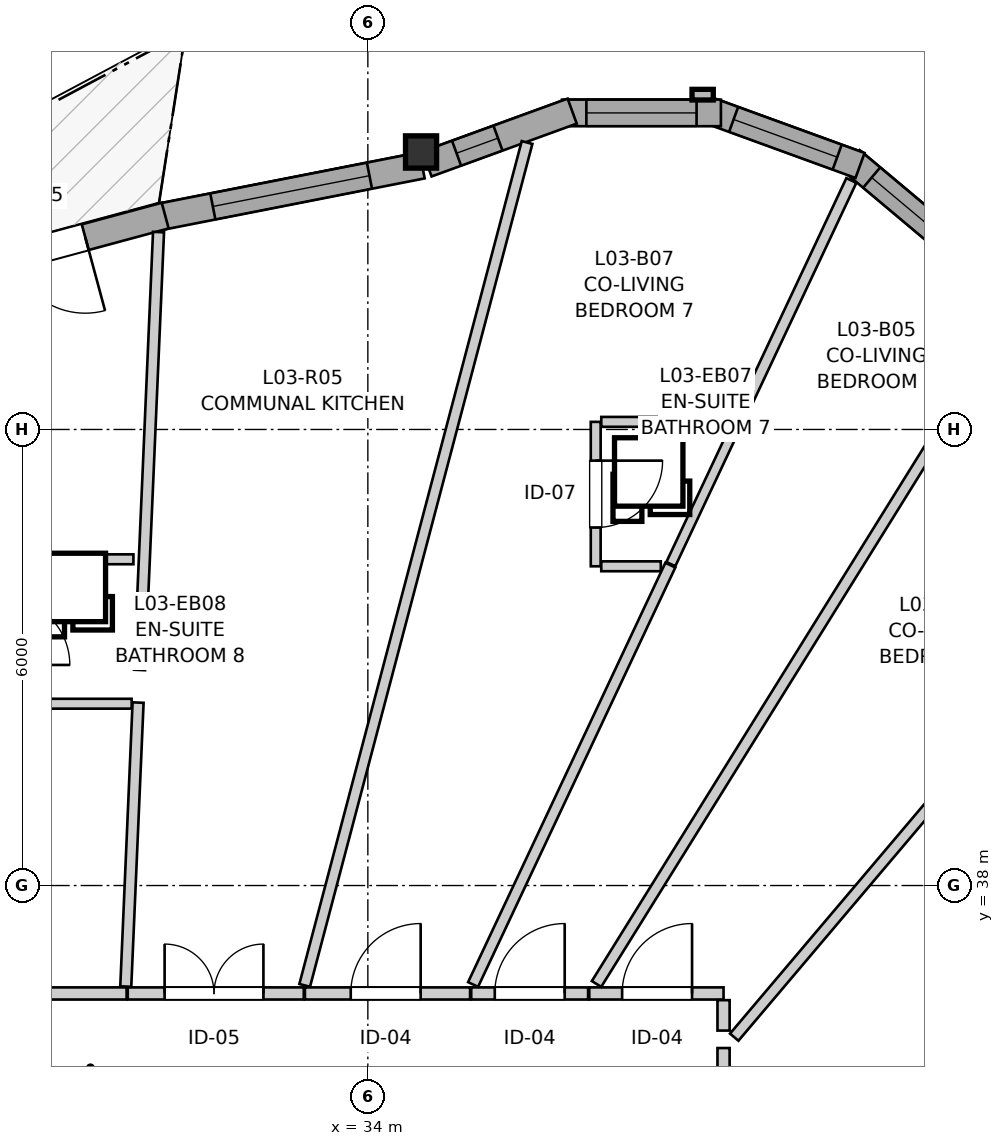
"""IFC4 building model, lengths in metres.
Left out: names, types, materials, properties, quantities, classifications, styles, units other than length and angle.
Written with IfcOpenShell. Run it as: python <this file> out.ifc"""

import sys

from ifc_helpers import new_model, si_unit, direction, frame, frame_2d, origin, origin_2d, place, context, subcontext, project, spatial, rectangle, i_section, extrude, source, transform, mapped, element, fill, save


model = new_model("IFC4")
c1 = context("Model", 3, precision=1e-05, world=origin(), true_north=direction((0.0, 1.0)))
c2 = subcontext(c1, "Body", "Model", "MODEL_VIEW")
j1 = project(units=[si_unit("LENGTHUNIT", "METRE"), si_unit("PLANEANGLEUNIT", "RADIAN")], contexts=[c1])
p1 = place(None, origin())
s1 = spatial("IfcSite", under=j1, at=p1, CompositionType="ELEMENT")
p2 = place(p1, origin())
s2 = spatial("IfcBuilding", under=s1, at=p2, CompositionType="ELEMENT")
p3 = place(p2, frame((0.0, 0.0, 14.2)))
s3 = spatial("IfcBuildingStorey", under=s2, at=p3, CompositionType="ELEMENT", Elevation=14.2)
m1 = source(origin(), c2, "Body", "SweptSolid", [
    extrude(i_section(OverallWidth=0.409, OverallDepth=0.425, WebThickness=0.03, FlangeThickness=0.048, FilletRadius=0.015, at=origin_2d()), origin(), (0.0, 0.0, 1.0), 2.94),
])
p4 = place(p3, frame((34.7, 47.651, 0.0), z_axis=(0.0, 0.0, 1.0), x_axis=(1.0, 0.0, 0.0)))
e1 = element("IfcColumn", 1, at=p4, inside=s3, PredefinedType="PILASTER", context=c2, shape_type="MappedRepresentation", body=[
    mapped(m1, transform((0.0, 0.0, 0.0), x_axis=(1.0, 0.0, 0.0), y_axis=(0.0, 1.0, 0.0), z_axis=(0.0, 0.0, 1.0), scale=1.0)),
])
p5 = place(p3, frame((41.96, 46.198, 0.0), z_axis=(0.0, 0.0, 1.0), x_axis=(-0.766082082368, 0.642742750308, 0.0)))
e2 = element("IfcWall", 2, at=p5, inside=s3, PredefinedType="SOLIDWALL", context=c2, shape_type="SweptSolid", body=[
    extrude(rectangle(XDim=2.09, YDim=0.35, at=frame_2d((1.045, 0.0))), origin(), (0.0, 0.0, 1.0), 2.42),
])
p6 = place(p5, frame((0.287, 0.0, 0.82)))
e3 = element("IfcOpeningElement", 3, at=p6, cuts=e2, PredefinedType="OPENING", context=c2, shape_type="SweptSolid", body=[
    extrude(rectangle(XDim=1.45, YDim=1.25, at=frame_2d((0.725, 0.625))), frame((0.0, 0.185, 0.0), z_axis=(0.0, -1.0, 0.0), x_axis=(1.0, 0.0, 0.0)), (0.0, 0.0, 1.0), 0.37),
])
p7 = place(p3, frame((40.476, 47.473, 0.0), z_axis=(0.0, 0.0, 1.0), x_axis=(-0.939660353162, 0.342108784886, 0.0)))
e4 = element("IfcWall", 4, at=p7, inside=s3, PredefinedType="SOLIDWALL", context=c2, shape_type="SweptSolid", body=[
    extrude(rectangle(XDim=2.09, YDim=0.35, at=frame_2d((1.045, 0.0))), origin(), (0.0, 0.0, 1.0), 2.42),
])
p8 = place(p7, frame((0.32, 0.0, 0.82)))
e5 = element("IfcOpeningElement", 5, at=p8, cuts=e4, PredefinedType="OPENING", context=c2, shape_type="SweptSolid", body=[
    extrude(rectangle(XDim=1.45, YDim=1.25, at=frame_2d((0.725, 0.625))), frame((0.0, 0.185, 0.0), z_axis=(0.0, -1.0, 0.0), x_axis=(1.0, 0.0, 0.0)), (0.0, 0.0, 1.0), 0.37),
])
p9 = place(p3, frame((38.645, 48.165, 0.0), z_axis=(0.0, 0.0, 1.0), x_axis=(-1.0, 0.0, 0.0)))
e6 = element("IfcWall", 6, at=p9, inside=s3, PredefinedType="SOLIDWALL", context=c2, shape_type="SweptSolid", body=[
    extrude(rectangle(XDim=2.091, YDim=0.35, at=frame_2d((1.045, 0.0))), origin(), (0.0, 0.0, 1.0), 2.42),
])
p10 = place(p9, frame((0.32, 0.0, 0.82)))
e7 = element("IfcOpeningElement", 7, at=p10, cuts=e6, PredefinedType="OPENING", context=c2, shape_type="SweptSolid", body=[
    extrude(rectangle(XDim=1.45, YDim=1.25, at=frame_2d((0.725, 0.625))), frame((0.0, 0.185, 0.0), z_axis=(0.0, -1.0, 0.0), x_axis=(1.0, 0.0, 0.0)), (0.0, 0.0, 1.0), 0.37),
])
p11 = place(p3, frame((36.688, 48.188, 0.0), z_axis=(0.0, 0.0, 1.0), x_axis=(-0.939653047052, -0.342128851701, 0.0)))
e8 = element("IfcWall", 8, at=p11, inside=s3, PredefinedType="SOLIDWALL", context=c2, shape_type="SweptSolid", body=[
    extrude(rectangle(XDim=2.032, YDim=0.35, at=frame_2d((1.016, 0.0))), origin(), (0.0, 0.0, 1.0), 2.42),
])
p12 = place(p11, frame((1.039, 0.0, 0.82)))
e9 = element("IfcOpeningElement", 9, at=p12, cuts=e8, PredefinedType="OPENING", context=c2, shape_type="SweptSolid", body=[
    extrude(rectangle(XDim=0.58, YDim=1.35, at=frame_2d((0.29, 0.675))), frame((0.0, 0.185, 0.0), z_axis=(0.0, -1.0, 0.0), x_axis=(1.0, 0.0, 0.0)), (0.0, 0.0, 1.0), 0.37),
])
p13 = place(p3, frame((34.714, 47.475, 0.0), z_axis=(0.0, 0.0, 1.0), x_axis=(-0.981221268425, -0.192885516282, 0.0)))
e10 = element("IfcWall", 10, at=p13, inside=s3, PredefinedType="SOLIDWALL", context=c2, shape_type="SweptSolid", body=[
    extrude(rectangle(XDim=3.533, YDim=0.35, at=frame_2d((1.766, 0.0))), origin(), (0.0, 0.0, 1.0), 2.42),
])
p14 = place(p13, frame((0.706, 0.0, 0.82)))
e11 = element("IfcOpeningElement", 11, at=p14, cuts=e10, PredefinedType="OPENING", context=c2, shape_type="SweptSolid", body=[
    extrude(rectangle(XDim=2.1, YDim=1.4, at=frame_2d((1.05, 0.7))), frame((0.0, 0.185, 0.0), z_axis=(0.0, -1.0, 0.0), x_axis=(1.0, 0.0, 0.0)), (0.0, 0.0, 1.0), 0.37),
])
p15 = place(p3, frame((31.333, 46.814, 0.0), z_axis=(0.0, 0.0, 1.0), x_axis=(-0.965456905924, -0.260562780926, 0.0)))
e12 = element("IfcWall", 12, at=p15, inside=s3, PredefinedType="SOLIDWALL", context=c2, shape_type="SweptSolid", body=[
    extrude(rectangle(XDim=3.179, YDim=0.35, at=frame_2d((1.59, 0.0))), origin(), (0.0, 0.0, 1.0), 2.42),
])
p16 = place(p15, frame((1.09, 0.0, 0.0)))
e13 = element("IfcOpeningElement", 13, at=p16, cuts=e12, PredefinedType="OPENING", context=c2, shape_type="SweptSolid", body=[
    extrude(rectangle(XDim=1.0, YDim=2.1, at=frame_2d((0.5, 1.05))), frame((0.0, 0.185, 0.0), z_axis=(0.0, -1.0, 0.0), x_axis=(1.0, 0.0, 0.0)), (0.0, 0.0, 1.0), 0.37),
])
p17 = place(p3, frame((27.756, 36.58, 0.0), z_axis=(0.0, 0.0, 1.0), x_axis=(1.0, 0.0, 0.0)))
e14 = element("IfcWall", 14, at=p17, inside=s3, PredefinedType="PARTITIONING", context=c2, shape_type="SweptSolid", body=[
    extrude(rectangle(XDim=3.07, YDim=0.16, at=frame_2d((1.535, 0.0))), origin(), (0.0, 0.0, 1.0), 2.94),
])
p18 = place(p17, frame((1.052, 0.0, 0.0)))
e15 = element("IfcOpeningElement", 15, at=p18, cuts=e14, PredefinedType="OPENING", context=c2, shape_type="SweptSolid", body=[
    extrude(rectangle(XDim=0.92, YDim=2.1, at=frame_2d((0.46, 1.05))), frame((0.0, 0.09, 0.0), z_axis=(0.0, -1.0, 0.0), x_axis=(1.0, 0.0, 0.0)), (0.0, 0.0, 1.0), 0.18),
])
p19 = place(p3, frame((38.68, 35.862, 0.0), z_axis=(0.0, 0.0, 1.0), x_axis=(0.0, -1.0, 0.0)))
e16 = element("IfcWall", 16, at=p19, inside=s3, PredefinedType="PARTITIONING", context=c2, shape_type="SweptSolid", body=[
    extrude(rectangle(XDim=3.024, YDim=0.16, at=frame_2d((1.512, 0.0))), origin(), (0.0, 0.0, 1.0), 2.94),
])
p20 = place(p19, frame((1.053, 0.0, 0.0)))
e17 = element("IfcOpeningElement", 17, at=p20, cuts=e16, PredefinedType="OPENING", context=c2, shape_type="SweptSolid", body=[
    extrude(rectangle(XDim=0.92, YDim=2.1, at=frame_2d((0.46, 1.05))), frame((0.0, 0.09, 0.0), z_axis=(0.0, -1.0, 0.0), x_axis=(1.0, 0.0, 0.0)), (0.0, 0.0, 1.0), 0.18),
])
p21 = place(p3, frame((30.841, 36.58, 0.0), z_axis=(0.0, 0.0, 1.0), x_axis=(1.0, 0.0, 0.0)))
e18 = element("IfcWall", 18, at=p21, inside=s3, PredefinedType="PARTITIONING", context=c2, shape_type="SweptSolid", body=[
    extrude(rectangle(XDim=2.316, YDim=0.16, at=frame_2d((1.158, 0.0))), origin(), (0.0, 0.0, 1.0), 2.94),
])
p22 = place(p21, frame((0.485, 0.0, 0.0)))
e19 = element("IfcOpeningElement", 19, at=p22, cuts=e18, PredefinedType="OPENING", context=c2, shape_type="SweptSolid", body=[
    extrude(rectangle(XDim=1.3, YDim=2.1, at=frame_2d((0.65, 1.05))), frame((0.0, 0.09, 0.0), z_axis=(0.0, -1.0, 0.0), x_axis=(1.0, 0.0, 0.0)), (0.0, 0.0, 1.0), 0.18),
])
p23 = place(p3, frame((33.172, 36.58, 0.0), z_axis=(0.0, 0.0, 1.0), x_axis=(1.0, 0.0, 0.0)))
e20 = element("IfcWall", 20, at=p23, inside=s3, PredefinedType="PARTITIONING", context=c2, shape_type="SweptSolid", body=[
    extrude(rectangle(XDim=2.173, YDim=0.16, at=frame_2d((1.086, 0.0))), origin(), (0.0, 0.0, 1.0), 2.94),
])
p24 = place(p23, frame((0.603, 0.0, 0.0)))
e21 = element("IfcOpeningElement", 21, at=p24, cuts=e20, PredefinedType="OPENING", context=c2, shape_type="SweptSolid", body=[
    extrude(rectangle(XDim=0.92, YDim=2.1, at=frame_2d((0.46, 1.05))), frame((0.0, 0.09, 0.0), z_axis=(0.0, -1.0, 0.0), x_axis=(1.0, 0.0, 0.0)), (0.0, 0.0, 1.0), 0.18),
])
p25 = place(p3, frame((36.998, 44.1, 0.0), z_axis=(0.0, 0.0, 1.0), x_axis=(0.0, -1.0, 0.0)))
e22 = element("IfcWall", 22, at=p25, inside=s3, PredefinedType="PARTITIONING", context=c2, shape_type="SweptSolid", body=[
    extrude(rectangle(XDim=1.9, YDim=0.13, at=frame_2d((0.95, 0.0))), origin(), (0.0, 0.0, 1.0), 2.94),
])
p26 = place(p25, frame((0.51, 0.0, 0.0)))
e23 = element("IfcOpeningElement", 23, at=p26, cuts=e22, PredefinedType="OPENING", context=c2, shape_type="SweptSolid", body=[
    extrude(rectangle(XDim=0.88, YDim=2.05, at=frame_2d((0.44, 1.025))), frame((0.0, 0.075, 0.0), z_axis=(0.0, -1.0, 0.0), x_axis=(1.0, 0.0, 0.0)), (0.0, 0.0, 1.0), 0.15),
])
p27 = place(p3, frame((36.913, 36.58, 0.0), z_axis=(0.0, 0.0, 1.0), x_axis=(1.0, 0.0, 0.0)))
e24 = element("IfcWall", 24, at=p27, inside=s3, PredefinedType="PARTITIONING", context=c2, shape_type="SweptSolid", body=[
    extrude(rectangle(XDim=1.767, YDim=0.16, at=frame_2d((0.883, 0.0))), origin(), (0.0, 0.0, 1.0), 2.94),
])
p28 = place(p27, frame((0.433, 0.0, 0.0)))
e25 = element("IfcOpeningElement", 25, at=p28, cuts=e24, PredefinedType="OPENING", context=c2, shape_type="SweptSolid", body=[
    extrude(rectangle(XDim=0.92, YDim=2.1, at=frame_2d((0.46, 1.05))), frame((0.0, 0.09, 0.0), z_axis=(0.0, -1.0, 0.0), x_axis=(1.0, 0.0, 0.0)), (0.0, 0.0, 1.0), 0.18),
])
p29 = place(p3, frame((35.36, 36.58, 0.0), z_axis=(0.0, 0.0, 1.0), x_axis=(1.0, 0.0, 0.0)))
e26 = element("IfcWall", 26, at=p29, inside=s3, PredefinedType="PARTITIONING", context=c2, shape_type="SweptSolid", body=[
    extrude(rectangle(XDim=1.538, YDim=0.16, at=frame_2d((0.769, 0.0))), origin(), (0.0, 0.0, 1.0), 2.94),
])
p30 = place(p29, frame((0.31, 0.0, 0.0)))
e27 = element("IfcOpeningElement", 27, at=p30, cuts=e26, PredefinedType="OPENING", context=c2, shape_type="SweptSolid", body=[
    extrude(rectangle(XDim=0.92, YDim=2.1, at=frame_2d((0.46, 1.05))), frame((0.0, 0.09, 0.0), z_axis=(0.0, -1.0, 0.0), x_axis=(1.0, 0.0, 0.0)), (0.0, 0.0, 1.0), 0.18),
])
p31 = place(p3, frame((33.169, 36.686, 0.0), z_axis=(0.0, 0.0, 1.0), x_axis=(0.255112522394, 0.966911371801, 0.0)))
e28 = element("IfcWall", 28, at=p31, inside=s3, PredefinedType="PARTITIONING", context=c2, shape_type="SweptSolid", body=[
    extrude(rectangle(XDim=11.469, YDim=0.145, at=frame_2d((5.734, 0.0))), origin(), (0.0, 0.0, 1.0), 2.94),
])
p32 = place(p3, frame((37.009, 36.705, 0.0), z_axis=(0.0, 0.0, 1.0), x_axis=(0.528183829193, 0.849130050451, 0.0)))
e29 = element("IfcWall", 29, at=p32, inside=s3, PredefinedType="PARTITIONING", context=c2, shape_type="SweptSolid", body=[
    extrude(rectangle(XDim=10.005, YDim=0.145, at=frame_2d((5.003, 0.0))), origin(), (0.0, 0.0, 1.0), 2.94),
])
p33 = place(p3, frame((38.812, 32.967, 0.0), z_axis=(0.0, 0.0, 1.0), x_axis=(0.772048037558, 0.635564180633, 0.0)))
e30 = element("IfcWall", 30, at=p33, inside=s3, PredefinedType="PARTITIONING", context=c2, shape_type="SweptSolid", body=[
    extrude(rectangle(XDim=7.477, YDim=0.145, at=frame_2d((3.739, 0.0))), origin(), (0.0, 0.0, 1.0), 2.94),
])
p34 = place(p3, frame((38.821, 36.005, 0.0), z_axis=(0.0, 0.0, 1.0), x_axis=(0.646174151972, 0.76318999294, 0.0)))
e31 = element("IfcWall", 31, at=p34, inside=s3, PredefinedType="PARTITIONING", context=c2, shape_type="SweptSolid", body=[
    extrude(rectangle(XDim=7.125, YDim=0.145, at=frame_2d((3.562, 0.0))), origin(), (0.0, 0.0, 1.0), 2.94),
])
p35 = place(p3, frame((35.385, 36.698, 0.0), z_axis=(0.0, 0.0, 1.0), x_axis=(0.425687116038, 0.904870421242, 0.0)))
e32 = element("IfcWall", 32, at=p35, inside=s3, PredefinedType="PARTITIONING", context=c2, shape_type="SweptSolid", body=[
    extrude(rectangle(XDim=6.097, YDim=0.145, at=frame_2d((3.049, 0.0))), origin(), (0.0, 0.0, 1.0), 2.94),
])
p36 = place(p3, frame((30.996, 40.836, 0.0), z_axis=(0.0, 0.0, 1.0), x_axis=(0.043354544378, 0.999059749706, 0.0)))
e33 = element("IfcWall", 33, at=p36, inside=s3, PredefinedType="PARTITIONING", context=c2, shape_type="SweptSolid", body=[
    extrude(rectangle(XDim=5.766, YDim=0.145, at=frame_2d((2.883, 0.0))), origin(), (0.0, 0.0, 1.0), 2.94),
])
p37 = place(p3, frame((30.815, 36.671, 0.0), z_axis=(0.0, 0.0, 1.0), x_axis=(0.043352224588, 0.999059850371, 0.0)))
e34 = element("IfcWall", 34, at=p37, inside=s3, PredefinedType="PARTITIONING", context=c2, shape_type="SweptSolid", body=[
    extrude(rectangle(XDim=3.739, YDim=0.145, at=frame_2d((1.87, 0.0))), origin(), (0.0, 0.0, 1.0), 2.94),
])
p38 = place(p3, frame((38.783, 43.921, 0.0), z_axis=(0.0, 0.0, 1.0), x_axis=(0.425698730146, 0.904864957412, 0.0)))
e35 = element("IfcWall", 35, at=p38, inside=s3, PredefinedType="PARTITIONING", context=c2, shape_type="SweptSolid", body=[
    extrude(rectangle(XDim=3.708, YDim=0.145, at=frame_2d((1.854, 0.0))), origin(), (0.0, 0.0, 1.0), 2.94),
])
p39 = place(p3, frame((37.987, 42.229, 0.0), z_axis=(0.0, 0.0, 1.0), x_axis=(0.425771690569, 0.904830629184, 0.0)))
e36 = element("IfcWall", 36, at=p39, inside=s3, PredefinedType="PARTITIONING", context=c2, shape_type="SweptSolid", body=[
    extrude(rectangle(XDim=1.855, YDim=0.13, at=frame_2d((0.928, 0.0))), origin(), (0.0, 0.0, 1.0), 2.94),
])
p40 = place(p3, frame((37.071, 44.1, 0.0), z_axis=(0.0, 0.0, 1.0), x_axis=(1.0, 0.0, 0.0)))
e37 = element("IfcWall", 37, at=p40, inside=s3, PredefinedType="PARTITIONING", context=c2, shape_type="SweptSolid", body=[
    extrude(rectangle(XDim=1.608, YDim=0.13, at=frame_2d((0.804, 0.0))), origin(), (0.0, 0.0, 1.0), 2.94),
])
p41 = place(p3, frame((29.272, 42.292, 0.0), z_axis=(0.0, 0.0, 1.0), x_axis=(1.0, 0.0, 0.0)))
e38 = element("IfcWall", 38, at=p41, inside=s3, PredefinedType="PARTITIONING", context=c2, shape_type="SweptSolid", body=[
    extrude(rectangle(XDim=1.644, YDim=0.13, at=frame_2d((0.822, 0.0))), origin(), (0.0, 0.0, 1.0), 2.508),
])
p42 = place(p3, frame((29.272, 40.392, 0.0), z_axis=(0.0, 0.0, 1.0), x_axis=(1.0, 0.0, 0.0)))
e39 = element("IfcWall", 39, at=p42, inside=s3, PredefinedType="PARTITIONING", context=c2, shape_type="SweptSolid", body=[
    extrude(rectangle(XDim=1.621, YDim=0.13, at=frame_2d((0.81, 0.0))), origin(), (0.0, 0.0, 1.0), 2.94),
])
p43 = place(p3, frame((37.071, 42.2, 0.0), z_axis=(0.0, 0.0, 1.0), x_axis=(1.0, 0.0, 0.0)))
e40 = element("IfcWall", 40, at=p43, inside=s3, PredefinedType="PARTITIONING", context=c2, shape_type="SweptSolid", body=[
    extrude(rectangle(XDim=0.783, YDim=0.13, at=frame_2d((0.392, 0.0))), origin(), (0.0, 0.0, 1.0), 2.94),
])
p44 = place(p3, frame((38.68, 36.092, 0.0), z_axis=(0.0, 0.0, 1.0), x_axis=(0.0, 1.0, 0.0)))
e41 = element("IfcWall", 41, at=p44, inside=s3, PredefinedType="PARTITIONING", context=c2, shape_type="SweptSolid", body=[
    extrude(rectangle(XDim=0.4, YDim=0.16, at=frame_2d((0.2, 0.0))), origin(), (0.0, 0.0, 1.0), 2.94),
])
m2 = source(origin(), c2, "Body", "SweptSolid", [
    extrude(rectangle(XDim=1.45, YDim=1.25, at=frame_2d((0.725, 0.625))), frame((0.0, 0.03, 0.0), z_axis=(0.0, -1.0, 0.0), x_axis=(1.0, 0.0, 0.0)), (0.0, 0.0, 1.0), 0.06),
])
p45 = place(p6, origin())
e42 = element("IfcWindow", 42, at=p45, inside=s3, PartitioningType="SINGLE_PANEL", PredefinedType="WINDOW", context=c2, shape_type="MappedRepresentation", body=[
    mapped(m2, transform((0.0, 0.0, 0.0), x_axis=(1.0, 0.0, 0.0), y_axis=(0.0, 1.0, 0.0), z_axis=(0.0, 0.0, 1.0), scale=1.0)),
])
fill(e3, e42)
p46 = place(p8, origin())
e43 = element("IfcWindow", 43, at=p46, inside=s3, PartitioningType="SINGLE_PANEL", PredefinedType="WINDOW", context=c2, shape_type="MappedRepresentation", body=[
    mapped(m2, transform((0.0, 0.0, 0.0), x_axis=(1.0, 0.0, 0.0), y_axis=(0.0, 1.0, 0.0), z_axis=(0.0, 0.0, 1.0), scale=1.0)),
])
fill(e5, e43)
p47 = place(p10, origin())
e44 = element("IfcWindow", 44, at=p47, inside=s3, PartitioningType="SINGLE_PANEL", PredefinedType="WINDOW", context=c2, shape_type="MappedRepresentation", body=[
    mapped(m2, transform((0.0, 0.0, 0.0), x_axis=(1.0, 0.0, 0.0), y_axis=(0.0, 1.0, 0.0), z_axis=(0.0, 0.0, 1.0), scale=1.0)),
])
fill(e7, e44)
m3 = source(origin(), c2, "Body", "SweptSolid", [
    extrude(rectangle(XDim=0.58, YDim=1.35, at=frame_2d((0.29, 0.675))), frame((0.0, 0.03, 0.0), z_axis=(0.0, -1.0, 0.0), x_axis=(1.0, 0.0, 0.0)), (0.0, 0.0, 1.0), 0.06),
])
p48 = place(p12, origin())
e45 = element("IfcWindow", 45, at=p48, inside=s3, PartitioningType="SINGLE_PANEL", PredefinedType="WINDOW", context=c2, shape_type="MappedRepresentation", body=[
    mapped(m3, transform((0.0, 0.0, 0.0), x_axis=(1.0, 0.0, 0.0), y_axis=(0.0, 1.0, 0.0), z_axis=(0.0, 0.0, 1.0), scale=1.0)),
])
fill(e9, e45)
m4 = source(origin(), c2, "Body", "SweptSolid", [
    extrude(rectangle(XDim=2.1, YDim=1.4, at=frame_2d((1.05, 0.7))), frame((0.0, 0.03, 0.0), z_axis=(0.0, -1.0, 0.0), x_axis=(1.0, 0.0, 0.0)), (0.0, 0.0, 1.0), 0.06),
])
p49 = place(p14, origin())
e46 = element("IfcWindow", 46, at=p49, inside=s3, PartitioningType="SINGLE_PANEL", PredefinedType="WINDOW", context=c2, shape_type="MappedRepresentation", body=[
    mapped(m4, transform((0.0, 0.0, 0.0), x_axis=(1.0, 0.0, 0.0), y_axis=(0.0, 1.0, 0.0), z_axis=(0.0, 0.0, 1.0), scale=1.0)),
])
fill(e11, e46)
m5 = source(origin(), c2, "Body", "SweptSolid", [
    extrude(rectangle(XDim=1.0, YDim=2.1, at=frame_2d((0.5, 1.05))), frame((0.0, 0.025, 0.0), z_axis=(0.0, -1.0, 0.0), x_axis=(1.0, 0.0, 0.0)), (0.0, 0.0, 1.0), 0.05),
])
p50 = place(p16, origin())
e47 = element("IfcDoor", 47, at=p50, inside=s3, OperationType="SINGLE_SWING_LEFT", PredefinedType="DOOR", context=c2, shape_type="MappedRepresentation", body=[
    mapped(m5, transform((0.0, 0.0, 0.0), x_axis=(1.0, 0.0, 0.0), y_axis=(0.0, 1.0, 0.0), z_axis=(0.0, 0.0, 1.0), scale=1.0)),
])
fill(e13, e47)
m6 = source(origin(), c2, "Body", "SweptSolid", [
    extrude(rectangle(XDim=1.3, YDim=2.1, at=frame_2d((0.65, 1.05))), frame((0.0, 0.025, 0.0), z_axis=(0.0, -1.0, 0.0), x_axis=(1.0, 0.0, 0.0)), (0.0, 0.0, 1.0), 0.05),
])
p51 = place(p22, origin())
e48 = element("IfcDoor", 48, at=p51, inside=s3, OperationType="DOUBLE_DOOR_SINGLE_SWING", PredefinedType="DOOR", context=c2, shape_type="MappedRepresentation", body=[
    mapped(m6, transform((0.0, 0.0, 0.0), x_axis=(1.0, 0.0, 0.0), y_axis=(0.0, 1.0, 0.0), z_axis=(0.0, 0.0, 1.0), scale=1.0)),
])
fill(e19, e48)
m7 = source(origin(), c2, "Body", "SweptSolid", [
    extrude(rectangle(XDim=0.92, YDim=2.1, at=frame_2d((0.46, 1.05))), frame((0.0, 0.025, 0.0), z_axis=(0.0, -1.0, 0.0), x_axis=(1.0, 0.0, 0.0)), (0.0, 0.0, 1.0), 0.05),
])
p52 = place(p24, origin())
e49 = element("IfcDoor", 49, at=p52, inside=s3, OperationType="SINGLE_SWING_RIGHT", PredefinedType="DOOR", context=c2, shape_type="MappedRepresentation", body=[
    mapped(m7, transform((0.0, 0.0, 0.0), x_axis=(1.0, 0.0, 0.0), y_axis=(0.0, 1.0, 0.0), z_axis=(0.0, 0.0, 1.0), scale=1.0)),
])
fill(e21, e49)
m8 = source(origin(), c2, "Body", "SweptSolid", [
    extrude(rectangle(XDim=0.88, YDim=2.05, at=frame_2d((0.44, 1.025))), frame((0.0, 0.025, 0.0), z_axis=(0.0, -1.0, 0.0), x_axis=(1.0, 0.0, 0.0)), (0.0, 0.0, 1.0), 0.05),
])
p53 = place(p26, origin())
e50 = element("IfcDoor", 50, at=p53, inside=s3, OperationType="SINGLE_SWING_LEFT", PredefinedType="DOOR", context=c2, shape_type="MappedRepresentation", body=[
    mapped(m8, transform((0.0, 0.0, 0.0), x_axis=(1.0, 0.0, 0.0), y_axis=(0.0, 1.0, 0.0), z_axis=(0.0, 0.0, 1.0), scale=1.0)),
])
fill(e23, e50)
p54 = place(p28, origin())
e51 = element("IfcDoor", 51, at=p54, inside=s3, OperationType="SINGLE_SWING_RIGHT", PredefinedType="DOOR", context=c2, shape_type="MappedRepresentation", body=[
    mapped(m7, transform((0.0, 0.0, 0.0), x_axis=(1.0, 0.0, 0.0), y_axis=(0.0, 1.0, 0.0), z_axis=(0.0, 0.0, 1.0), scale=1.0)),
])
fill(e25, e51)
p55 = place(p30, origin())
e52 = element("IfcDoor", 52, at=p55, inside=s3, OperationType="SINGLE_SWING_RIGHT", PredefinedType="DOOR", context=c2, shape_type="MappedRepresentation", body=[
    mapped(m7, transform((0.0, 0.0, 0.0), x_axis=(1.0, 0.0, 0.0), y_axis=(0.0, 1.0, 0.0), z_axis=(0.0, 0.0, 1.0), scale=1.0)),
])
fill(e27, e52)
save(model, sys.argv[1])
